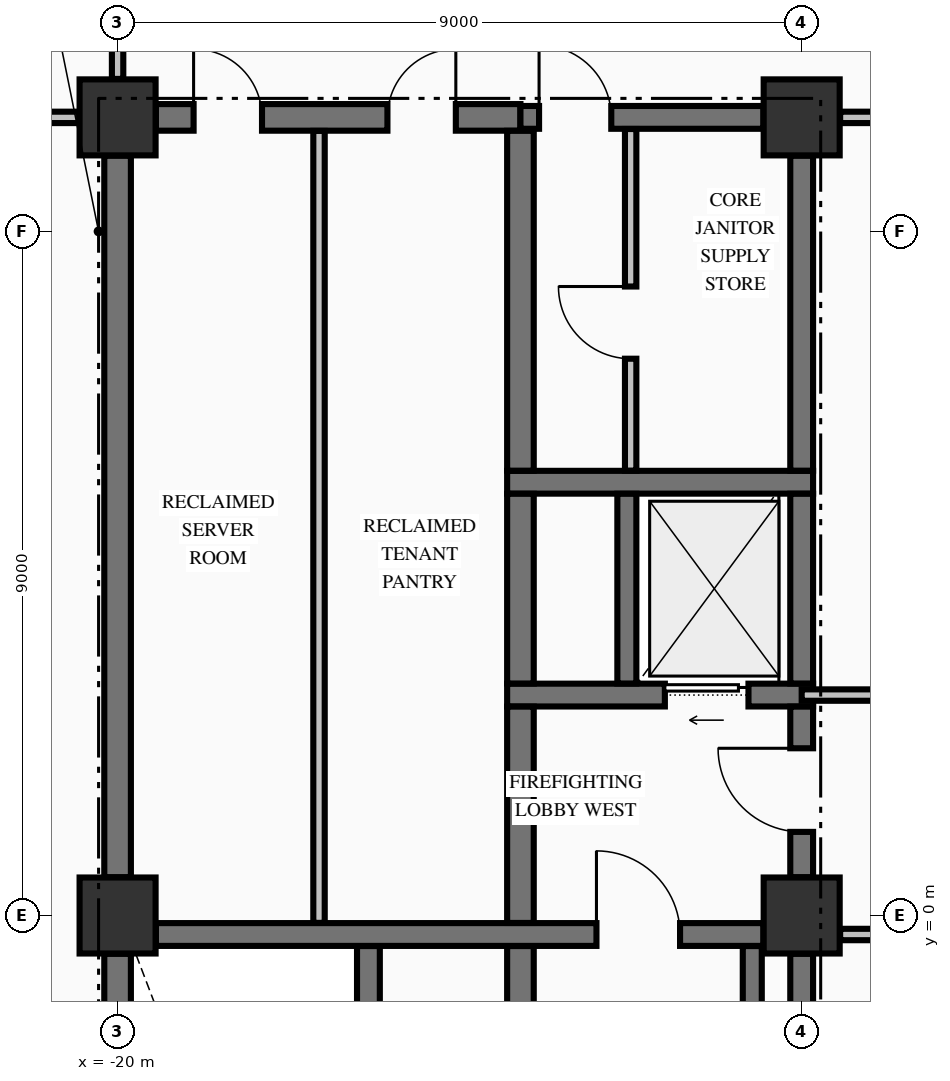
"""IFC4 building model, lengths in metres.
Left out: names, types, materials, properties, quantities, classifications, styles, units other than length and angle.
Written with IfcOpenShell. Run it as: python <this file> out.ifc"""

import sys

from ifc_helpers import new_model, si_unit, direction, frame, frame_2d, origin, origin_2d, place, context, subcontext, project, spatial, rectangle, extrude, element, fill, save


model = new_model("IFC4")
c1 = context("Model", 3, precision=1e-05, world=origin(), true_north=direction((0.0, 1.0)))
c2 = subcontext(c1, "Body", "Model", "MODEL_VIEW")
j1 = project(units=[si_unit("LENGTHUNIT", "METRE"), si_unit("PLANEANGLEUNIT", "RADIAN")], contexts=[c1])
p1 = place(None, origin())
s1 = spatial("IfcSite", under=j1, at=p1, CompositionType="ELEMENT")
p2 = place(p1, origin())
s2 = spatial("IfcBuilding", under=s1, at=p2, CompositionType="ELEMENT")
p3 = place(p2, frame((0.0, 0.0, 109.21)))
s3 = spatial("IfcBuildingStorey", under=s2, at=p3, CompositionType="ELEMENT", Elevation=109.21)
for number, where, z_axis, x_axis in (
    (1, (-20.0, 10.5, -0.25), (0.0, 0.0, 1.0), (1.0, 0.0, 0.0)),
    (2, (-11.0, 0.0, -0.25), (0.0, 0.0, 1.0), (1.0, 0.0, 0.0)),
    (3, (-11.0, 10.5, -0.25), (0.0, 0.0, 1.0), (1.0, 0.0, 0.0)),
    (4, (-20.0, 0.0, -0.25), (0.0, 0.0, 1.0), (1.0, 0.0, 0.0)),
):
    element("IfcColumn", number, at=place(p3, frame(where, z_axis=z_axis, x_axis=x_axis)), inside=s3, PredefinedType="COLUMN", context=c2, shape_type="SweptSolid", body=[
        extrude(rectangle(XDim=1.0, YDim=1.0, at=origin_2d()), origin(), (0.0, 0.0, 1.0), 3.57),
    ])
p4 = place(p3, frame((-19.496, -0.25, 0.0), z_axis=(0.0, 0.0, 1.0), x_axis=(1.0, 0.0, 0.0)))
e5 = element("IfcWall", 5, at=p4, inside=s3, PredefinedType="SHEAR", context=c2, shape_type="SweptSolid", body=[
    extrude(rectangle(XDim=7.992, YDim=0.3, at=frame_2d((3.996, 0.0))), origin(), (0.0, 0.0, 1.0), 3.32),
])
p5 = place(p4, frame((5.796, 0.0, 0.0)))
e6 = element("IfcOpeningElement", 6, at=p5, cuts=e5, PredefinedType="OPENING", context=c2, shape_type="SweptSolid", body=[
    extrude(rectangle(XDim=1.1, YDim=2.15, at=frame_2d((0.55, 1.075))), frame((0.0, 0.16, 0.0), z_axis=(0.0, -1.0, 0.0), x_axis=(1.0, 0.0, 0.0)), (0.0, 0.0, 1.0), 0.32),
])
p6 = place(p3, frame((-14.875, 2.9, 0.0), z_axis=(0.0, 0.0, 1.0), x_axis=(1.0, 0.0, 0.0)))
e7 = element("IfcWall", 7, at=p6, inside=s3, PredefinedType="SHEAR", context=c2, shape_type="SweptSolid", body=[
    extrude(rectangle(XDim=4.025, YDim=0.3, at=frame_2d((2.012, 0.0))), origin(), (0.0, 0.0, 1.0), 3.32),
])
p7 = place(p6, frame((2.075, 0.0, 0.0)))
e8 = element("IfcOpeningElement", 8, at=p7, cuts=e7, PredefinedType="OPENING", context=c2, shape_type="SweptSolid", body=[
    extrude(rectangle(XDim=1.1, YDim=2.2, at=frame_2d((0.55, 1.1))), frame((0.0, 0.16, 0.0), z_axis=(0.0, -1.0, 0.0), x_axis=(1.0, 0.0, 0.0)), (0.0, 0.0, 1.0), 0.32),
])
p8 = place(p3, frame((-14.875, 5.7, 0.0), z_axis=(0.0, 0.0, 1.0), x_axis=(1.0, 0.0, 0.0)))
e9 = element("IfcWall", 9, at=p8, inside=s3, PredefinedType="SHEAR", context=c2, shape_type="SweptSolid", body=[
    extrude(rectangle(XDim=4.025, YDim=0.3, at=frame_2d((2.012, 0.0))), origin(), (0.0, 0.0, 1.0), 3.32),
])
p9 = place(p3, frame((-19.496, 10.5, 0.0), z_axis=(0.0, 0.0, 1.0), x_axis=(1.0, 0.0, 0.0)))
e10 = element("IfcWall", 10, at=p9, inside=s3, PredefinedType="SHEAR", context=c2, shape_type="SweptSolid", body=[
    extrude(rectangle(XDim=4.796, YDim=0.35, at=frame_2d((2.398, 0.0))), origin(), (0.0, 0.0, 1.0), 3.32),
])
p10 = place(p9, frame((0.496, 0.0, 0.0)))
e11 = element("IfcOpeningElement", 11, at=p10, cuts=e10, PredefinedType="OPENING", context=c2, shape_type="SweptSolid", body=[
    extrude(rectangle(XDim=0.9, YDim=2.15, at=frame_2d((0.45, 1.075))), frame((0.0, 0.185, 0.0), z_axis=(0.0, -1.0, 0.0), x_axis=(1.0, 0.0, 0.0)), (0.0, 0.0, 1.0), 0.37),
])
p11 = place(p9, frame((3.046, 0.0, 0.0)))
e12 = element("IfcOpeningElement", 12, at=p11, cuts=e10, PredefinedType="OPENING", context=c2, shape_type="SweptSolid", body=[
    extrude(rectangle(XDim=0.9, YDim=2.15, at=frame_2d((0.45, 1.075))), frame((0.0, 0.185, 0.0), z_axis=(0.0, -1.0, 0.0), x_axis=(1.0, 0.0, 0.0)), (0.0, 0.0, 1.0), 0.37),
])
p12 = place(p3, frame((-14.7, 10.5, 0.0), z_axis=(0.0, 0.0, 1.0), x_axis=(1.0, 0.0, 0.0)))
e13 = element("IfcWall", 13, at=p12, inside=s3, PredefinedType="SHEAR", context=c2, shape_type="SweptSolid", body=[
    extrude(rectangle(XDim=3.196, YDim=0.3, at=frame_2d((1.598, 0.0))), origin(), (0.0, 0.0, 1.0), 3.32),
])
p13 = place(p12, frame((0.245, 0.0, 0.0)))
e14 = element("IfcOpeningElement", 14, at=p13, cuts=e13, PredefinedType="OPENING", context=c2, shape_type="SweptSolid", body=[
    extrude(rectangle(XDim=0.95, YDim=2.15, at=frame_2d((0.475, 1.075))), frame((0.0, 0.16, 0.0), z_axis=(0.0, -1.0, 0.0), x_axis=(1.0, 0.0, 0.0)), (0.0, 0.0, 1.0), 0.32),
])
p14 = place(p3, frame((-10.494, -0.25, 0.0), z_axis=(0.0, 0.0, 1.0), x_axis=(1.0, 0.0, 0.0)))
e15 = element("IfcWall", 15, at=p14, inside=s3, PredefinedType="PARTITIONING", context=c2, shape_type="SweptSolid", body=[
    extrude(rectangle(XDim=20.988, YDim=0.15, at=frame_2d((10.494, 0.0))), origin(), (0.0, 0.0, 1.0), 3.32),
])
p15 = place(p14, frame((15.394, 0.0, 0.0)))
e16 = element("IfcOpeningElement", 16, at=p15, cuts=e15, PredefinedType="OPENING", context=c2, shape_type="SweptSolid", body=[
    extrude(rectangle(XDim=1.1, YDim=2.15, at=frame_2d((0.55, 1.075))), frame((0.0, 0.085, 0.0), z_axis=(0.0, -1.0, 0.0), x_axis=(1.0, 0.0, 0.0)), (0.0, 0.0, 1.0), 0.17),
])
p16 = place(p14, frame((6.639, 0.0, 0.0)))
e17 = element("IfcOpeningElement", 17, at=p16, cuts=e15, PredefinedType="OPENING", context=c2, shape_type="SweptSolid", body=[
    extrude(rectangle(XDim=1.05, YDim=2.15, at=frame_2d((0.525, 1.075))), frame((0.0, 0.085, 0.0), z_axis=(0.0, -1.0, 0.0), x_axis=(1.0, 0.0, 0.0)), (0.0, 0.0, 1.0), 0.17),
])
p17 = place(p14, frame((18.799, 0.0, 0.0)))
e18 = element("IfcOpeningElement", 18, at=p17, cuts=e15, PredefinedType="OPENING", context=c2, shape_type="SweptSolid", body=[
    extrude(rectangle(XDim=0.95, YDim=2.15, at=frame_2d((0.475, 1.075))), frame((0.0, 0.085, 0.0), z_axis=(0.0, -1.0, 0.0), x_axis=(1.0, 0.0, 0.0)), (0.0, 0.0, 1.0), 0.17),
])
p18 = place(p3, frame((-11.0, 2.9, 0.0), z_axis=(0.0, 0.0, 1.0), x_axis=(1.0, 0.0, 0.0)))
e19 = element("IfcWall", 19, at=p18, inside=s3, PredefinedType="PARTITIONING", context=c2, shape_type="SweptSolid", body=[
    extrude(rectangle(XDim=22.0, YDim=0.15, at=frame_2d((11.0, 0.0))), origin(), (0.0, 0.0, 1.0), 3.32),
])
p19 = place(p18, frame((15.9, 0.0, 0.0)))
e20 = element("IfcOpeningElement", 20, at=p19, cuts=e19, PredefinedType="OPENING", context=c2, shape_type="SweptSolid", body=[
    extrude(rectangle(XDim=1.1, YDim=2.15, at=frame_2d((0.55, 1.075))), frame((0.0, 0.085, 0.0), z_axis=(0.0, -1.0, 0.0), x_axis=(1.0, 0.0, 0.0)), (0.0, 0.0, 1.0), 0.17),
])
p20 = place(p18, frame((7.145, 0.0, 0.0)))
e21 = element("IfcOpeningElement", 21, at=p20, cuts=e19, PredefinedType="OPENING", context=c2, shape_type="SweptSolid", body=[
    extrude(rectangle(XDim=1.05, YDim=2.15, at=frame_2d((0.525, 1.075))), frame((0.0, 0.085, 0.0), z_axis=(0.0, -1.0, 0.0), x_axis=(1.0, 0.0, 0.0)), (0.0, 0.0, 1.0), 0.17),
])
p21 = place(p18, frame((19.23, 0.0, 0.0)))
e22 = element("IfcOpeningElement", 22, at=p21, cuts=e19, PredefinedType="OPENING", context=c2, shape_type="SweptSolid", body=[
    extrude(rectangle(XDim=1.1, YDim=2.15, at=frame_2d((0.55, 1.075))), frame((0.0, 0.085, 0.0), z_axis=(0.0, -1.0, 0.0), x_axis=(1.0, 0.0, 0.0)), (0.0, 0.0, 1.0), 0.17),
])
p22 = place(p3, frame((-22.835, 10.5, 0.0), z_axis=(0.0, 0.0, 1.0), x_axis=(1.0, 0.0, 0.0)))
e23 = element("IfcWall", 23, at=p22, inside=s3, PredefinedType="PARTITIONING", context=c2, shape_type="SweptSolid", body=[
    extrude(rectangle(XDim=2.329, YDim=0.15, at=frame_2d((1.165, 0.0))), origin(), (0.0, 0.0, 1.0), 3.32),
])
p23 = place(p22, frame((0.835, 0.0, 0.0)))
e24 = element("IfcOpeningElement", 24, at=p23, cuts=e23, PredefinedType="OPENING", context=c2, shape_type="SweptSolid", body=[
    extrude(rectangle(XDim=1.0, YDim=2.15, at=frame_2d((0.5, 1.075))), frame((0.0, 0.085, 0.0), z_axis=(0.0, -1.0, 0.0), x_axis=(1.0, 0.0, 0.0)), (0.0, 0.0, 1.0), 0.17),
])
p24 = place(p3, frame((-10.494, 10.5, 0.0), z_axis=(0.0, 0.0, 1.0), x_axis=(1.0, 0.0, 0.0)))
e25 = element("IfcWall", 25, at=p24, inside=s3, PredefinedType="PARTITIONING", context=c2, shape_type="SweptSolid", body=[
    extrude(rectangle(XDim=20.988, YDim=0.15, at=frame_2d((10.494, 0.0))), origin(), (0.0, 0.0, 1.0), 3.32),
])
p25 = place(p24, frame((15.394, 0.0, 0.0)))
e26 = element("IfcOpeningElement", 26, at=p25, cuts=e25, PredefinedType="OPENING", context=c2, shape_type="SweptSolid", body=[
    extrude(rectangle(XDim=1.1, YDim=2.15, at=frame_2d((0.55, 1.075))), frame((0.0, 0.085, 0.0), z_axis=(0.0, -1.0, 0.0), x_axis=(1.0, 0.0, 0.0)), (0.0, 0.0, 1.0), 0.17),
])
p26 = place(p3, frame((-20.0, -9.446, 0.0), z_axis=(0.0, 0.0, 1.0), x_axis=(0.0, 1.0, 0.0)))
e27 = element("IfcWall", 27, at=p26, inside=s3, PredefinedType="SHEAR", context=c2, shape_type="SweptSolid", body=[
    extrude(rectangle(XDim=8.942, YDim=0.35, at=frame_2d((4.471, 0.0))), origin(), (0.0, 0.0, 1.0), 3.32),
])
p27 = place(p3, frame((-20.0, 0.504, 0.0), z_axis=(0.0, 0.0, 1.0), x_axis=(0.0, 1.0, 0.0)))
e28 = element("IfcWall", 28, at=p27, inside=s3, PredefinedType="SHEAR", context=c2, shape_type="SweptSolid", body=[
    extrude(rectangle(XDim=9.492, YDim=0.35, at=frame_2d((4.746, 0.0))), origin(), (0.0, 0.0, 1.0), 3.32),
])
p28 = place(p3, frame((-16.7, -9.773, 0.0), z_axis=(0.0, 0.0, 1.0), x_axis=(0.0, 1.0, 0.0)))
e29 = element("IfcWall", 29, at=p28, inside=s3, PredefinedType="SHEAR", context=c2, shape_type="SweptSolid", body=[
    extrude(rectangle(XDim=9.371, YDim=0.3, at=frame_2d((4.686, 0.0))), origin(), (0.0, 0.0, 1.0), 3.32),
])
p29 = place(p3, frame((-14.7, -9.773, 0.0), z_axis=(0.0, 0.0, 1.0), x_axis=(0.0, 1.0, 0.0)))
e30 = element("IfcWall", 30, at=p29, inside=s3, PredefinedType="SHEAR", context=c2, shape_type="SweptSolid", body=[
    extrude(rectangle(XDim=9.371, YDim=0.35, at=frame_2d((4.686, 0.0))), origin(), (0.0, 0.0, 1.0), 3.32),
])
p30 = place(p3, frame((-14.7, -0.098, 0.0), z_axis=(0.0, 0.0, 1.0), x_axis=(0.0, 1.0, 0.0)))
e31 = element("IfcWall", 31, at=p30, inside=s3, PredefinedType="SHEAR", context=c2, shape_type="SweptSolid", body=[
    extrude(rectangle(XDim=2.846, YDim=0.35, at=frame_2d((1.423, 0.0))), origin(), (0.0, 0.0, 1.0), 3.32),
])
p31 = place(p3, frame((-14.7, 3.052, 0.0), z_axis=(0.0, 0.0, 1.0), x_axis=(0.0, 1.0, 0.0)))
e32 = element("IfcWall", 32, at=p31, inside=s3, PredefinedType="SHEAR", context=c2, shape_type="SweptSolid", body=[
    extrude(rectangle(XDim=2.496, YDim=0.35, at=frame_2d((1.248, 0.0))), origin(), (0.0, 0.0, 1.0), 3.32),
])
p32 = place(p3, frame((-14.7, 5.852, 0.0), z_axis=(0.0, 0.0, 1.0), x_axis=(0.0, 1.0, 0.0)))
e33 = element("IfcWall", 33, at=p32, inside=s3, PredefinedType="SHEAR", context=c2, shape_type="SweptSolid", body=[
    extrude(rectangle(XDim=4.471, YDim=0.35, at=frame_2d((2.235, 0.0))), origin(), (0.0, 0.0, 1.0), 3.32),
])
p33 = place(p3, frame((-13.3, 3.052, 0.0), z_axis=(0.0, 0.0, 1.0), x_axis=(0.0, 1.0, 0.0)))
e34 = element("IfcWall", 34, at=p33, inside=s3, PredefinedType="SOLIDWALL", context=c2, shape_type="SweptSolid", body=[
    extrude(rectangle(XDim=2.496, YDim=0.25, at=frame_2d((1.248, 0.0))), origin(), (0.0, 0.0, 1.0), 3.32),
])
p34 = place(p3, frame((-11.65, -9.798, 0.0), z_axis=(0.0, 0.0, 1.0), x_axis=(0.0, 1.0, 0.0)))
e35 = element("IfcWall", 35, at=p34, inside=s3, PredefinedType="SOLIDWALL", context=c2, shape_type="SweptSolid", body=[
    extrude(rectangle(XDim=9.396, YDim=0.25, at=frame_2d((4.698, 0.0))), origin(), (0.0, 0.0, 1.0), 3.32),
])
p35 = place(p3, frame((-11.0, -9.446, 0.0), z_axis=(0.0, 0.0, 1.0), x_axis=(0.0, 1.0, 0.0)))
e36 = element("IfcWall", 36, at=p35, inside=s3, PredefinedType="SHEAR", context=c2, shape_type="SweptSolid", body=[
    extrude(rectangle(XDim=8.942, YDim=0.3, at=frame_2d((4.471, 0.0))), origin(), (0.0, 0.0, 1.0), 3.32),
])
p36 = place(p3, frame((-11.0, 0.504, 0.0), z_axis=(0.0, 0.0, 1.0), x_axis=(0.0, 1.0, 0.0)))
e37 = element("IfcWall", 37, at=p36, inside=s3, PredefinedType="SHEAR", context=c2, shape_type="SweptSolid", body=[
    extrude(rectangle(XDim=2.244, YDim=0.3, at=frame_2d((1.122, 0.0))), origin(), (0.0, 0.0, 1.0), 3.32),
])
p37 = place(p36, frame((0.596, 0.0, 0.0)))
e38 = element("IfcOpeningElement", 38, at=p37, cuts=e37, PredefinedType="OPENING", context=c2, shape_type="SweptSolid", body=[
    extrude(rectangle(XDim=1.1, YDim=2.15, at=frame_2d((0.55, 1.075))), frame((0.0, 0.16, 0.0), z_axis=(0.0, -1.0, 0.0), x_axis=(1.0, 0.0, 0.0)), (0.0, 0.0, 1.0), 0.32),
])
p38 = place(p3, frame((-11.0, 3.052, 0.0), z_axis=(0.0, 0.0, 1.0), x_axis=(0.0, 1.0, 0.0)))
e39 = element("IfcWall", 39, at=p38, inside=s3, PredefinedType="SHEAR", context=c2, shape_type="SweptSolid", body=[
    extrude(rectangle(XDim=2.496, YDim=0.3, at=frame_2d((1.248, 0.0))), origin(), (0.0, 0.0, 1.0), 3.32),
])
p39 = place(p3, frame((-11.0, 5.852, 0.0), z_axis=(0.0, 0.0, 1.0), x_axis=(0.0, 1.0, 0.0)))
e40 = element("IfcWall", 40, at=p39, inside=s3, PredefinedType="SHEAR", context=c2, shape_type="SweptSolid", body=[
    extrude(rectangle(XDim=4.144, YDim=0.3, at=frame_2d((2.072, 0.0))), origin(), (0.0, 0.0, 1.0), 3.32),
])
p40 = place(p3, frame((-20.0, 11.006, 0.0), z_axis=(0.0, 0.0, 1.0), x_axis=(0.0, 1.0, 0.0)))
e41 = element("IfcWall", 41, at=p40, inside=s3, PredefinedType="PARTITIONING", context=c2, shape_type="SweptSolid", body=[
    extrude(rectangle(XDim=2.266, YDim=0.15, at=frame_2d((1.133, 0.0))), origin(), (0.0, 0.0, 1.0), 2.81),
])
p41 = place(p40, frame((0.449, 0.0, 0.0)))
e42 = element("IfcOpeningElement", 42, at=p41, cuts=e41, PredefinedType="OPENING", context=c2, shape_type="SweptSolid", body=[
    extrude(rectangle(XDim=0.95, YDim=2.15, at=frame_2d((0.475, 1.075))), frame((0.0, 0.085, 0.0), z_axis=(0.0, -1.0, 0.0), x_axis=(1.0, 0.0, 0.0)), (0.0, 0.0, 1.0), 0.17),
])
p42 = place(p3, frame((-17.35, -0.097, 0.0), z_axis=(0.0, 0.0, 1.0), x_axis=(0.0, 1.0, 0.0)))
e43 = element("IfcWall", 43, at=p42, inside=s3, PredefinedType="PARTITIONING", context=c2, shape_type="SweptSolid", body=[
    extrude(rectangle(XDim=10.419, YDim=0.15, at=frame_2d((5.209, 0.0))), origin(), (0.0, 0.0, 1.0), 3.32),
])
p43 = place(p3, frame((-13.25, 5.853, 0.0), z_axis=(0.0, 0.0, 1.0), x_axis=(0.0, 1.0, 0.0)))
e44 = element("IfcWall", 44, at=p43, inside=s3, PredefinedType="PARTITIONING", context=c2, shape_type="SweptSolid", body=[
    extrude(rectangle(XDim=4.494, YDim=0.15, at=frame_2d((2.247, 0.0))), origin(), (0.0, 0.0, 1.0), 3.32),
])
p44 = place(p43, frame((1.472, 0.0, 0.0)))
e45 = element("IfcOpeningElement", 45, at=p44, cuts=e44, PredefinedType="OPENING", context=c2, shape_type="SweptSolid", body=[
    extrude(rectangle(XDim=0.95, YDim=2.15, at=frame_2d((0.475, 1.075))), frame((0.0, 0.085, 0.0), z_axis=(0.0, -1.0, 0.0), x_axis=(1.0, 0.0, 0.0)), (0.0, 0.0, 1.0), 0.17),
])
p45 = place(p5, origin())
e46 = element("IfcDoor", 46, at=p45, inside=s3, OperationType="SINGLE_SWING_LEFT", PredefinedType="DOOR", context=c2, shape_type="SweptSolid", body=[
    extrude(rectangle(XDim=1.1, YDim=2.15, at=frame_2d((0.55, 1.075))), frame((0.0, 0.025, 0.0), z_axis=(0.0, -1.0, 0.0), x_axis=(1.0, 0.0, 0.0)), (0.0, 0.0, 1.0), 0.05),
])
fill(e6, e46)
p46 = place(p37, origin())
e47 = element("IfcDoor", 47, at=p46, inside=s3, OperationType="SINGLE_SWING_RIGHT", PredefinedType="DOOR", context=c2, shape_type="SweptSolid", body=[
    extrude(rectangle(XDim=1.1, YDim=2.15, at=frame_2d((0.55, 1.075))), frame((0.0, 0.025, 0.0), z_axis=(0.0, -1.0, 0.0), x_axis=(1.0, 0.0, 0.0)), (0.0, 0.0, 1.0), 0.05),
])
fill(e38, e47)
p47 = place(p7, origin())
e48 = element("IfcDoor", 48, at=p47, inside=s3, OperationType="SLIDING_TO_LEFT", PredefinedType="DOOR", context=c2, shape_type="SweptSolid", body=[
    extrude(rectangle(XDim=1.1, YDim=2.2, at=frame_2d((0.55, 1.1))), frame((0.0, 0.025, 0.0), z_axis=(0.0, -1.0, 0.0), x_axis=(1.0, 0.0, 0.0)), (0.0, 0.0, 1.0), 0.05),
])
fill(e8, e48)
p48 = place(p13, origin())
e49 = element("IfcDoor", 49, at=p48, inside=s3, OperationType="SINGLE_SWING_LEFT", PredefinedType="DOOR", context=c2, shape_type="SweptSolid", body=[
    extrude(rectangle(XDim=0.95, YDim=2.15, at=frame_2d((0.475, 1.075))), frame((0.0, 0.025, 0.0), z_axis=(0.0, -1.0, 0.0), x_axis=(1.0, 0.0, 0.0)), (0.0, 0.0, 1.0), 0.05),
])
fill(e14, e49)
p49 = place(p44, origin())
e50 = element("IfcDoor", 50, at=p49, inside=s3, OperationType="SINGLE_SWING_RIGHT", PredefinedType="DOOR", context=c2, shape_type="SweptSolid", body=[
    extrude(rectangle(XDim=0.95, YDim=2.15, at=frame_2d((0.475, 1.075))), frame((0.0, 0.025, 0.0), z_axis=(0.0, -1.0, 0.0), x_axis=(1.0, 0.0, 0.0)), (0.0, 0.0, 1.0), 0.05),
])
fill(e45, e50)
p50 = place(p10, origin())
e51 = element("IfcDoor", 51, at=p50, inside=s3, OperationType="SINGLE_SWING_LEFT", PredefinedType="DOOR", context=c2, shape_type="SweptSolid", body=[
    extrude(rectangle(XDim=0.9, YDim=2.15, at=frame_2d((0.45, 1.075))), frame((0.0, 0.025, 0.0), z_axis=(0.0, -1.0, 0.0), x_axis=(1.0, 0.0, 0.0)), (0.0, 0.0, 1.0), 0.05),
])
fill(e11, e51)
p51 = place(p11, origin())
e52 = element("IfcDoor", 52, at=p51, inside=s3, OperationType="SINGLE_SWING_RIGHT", PredefinedType="DOOR", context=c2, shape_type="SweptSolid", body=[
    extrude(rectangle(XDim=0.9, YDim=2.15, at=frame_2d((0.45, 1.075))), frame((0.0, 0.025, 0.0), z_axis=(0.0, -1.0, 0.0), x_axis=(1.0, 0.0, 0.0)), (0.0, 0.0, 1.0), 0.05),
])
fill(e12, e52)
save(model, sys.argv[1])
